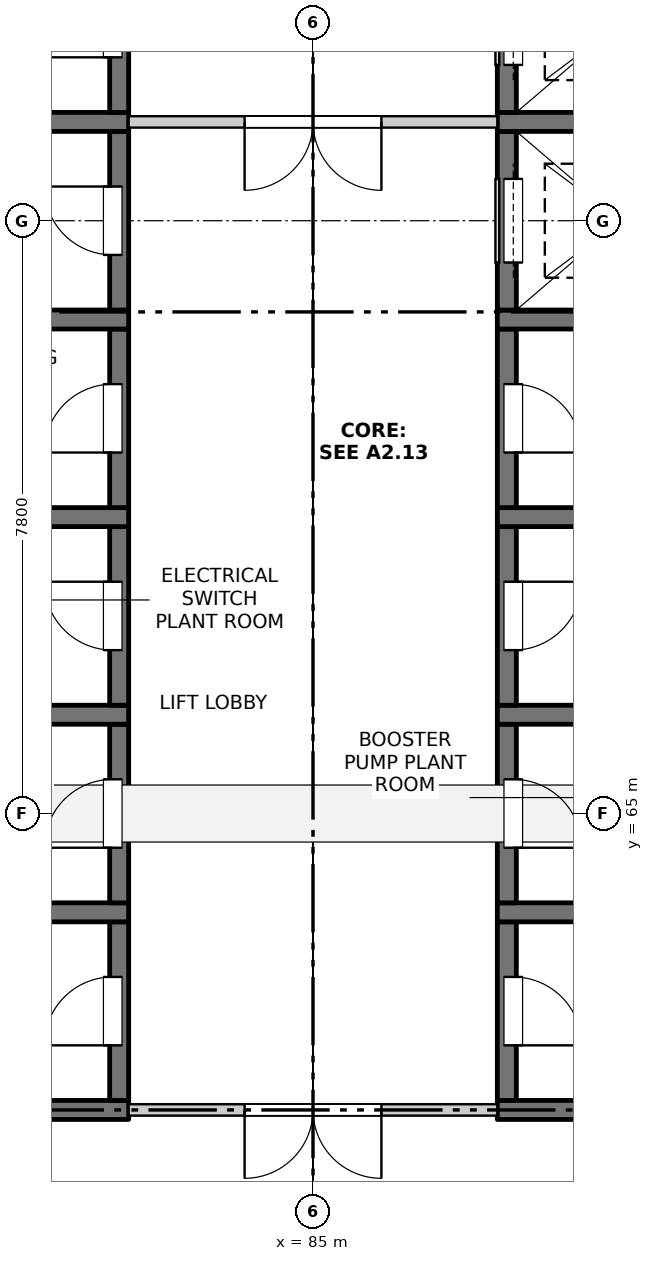
"""IFC4 building model, lengths in metres.
Left out: names, types, materials, properties, quantities, classifications, styles, units other than length and angle.
Written with IfcOpenShell. Run it as: python <this file> out.ifc"""

import sys

from ifc_helpers import new_model, si_unit, direction, frame, frame_2d, origin, place, context, subcontext, project, spatial, rectangle, extrude, element, fill, save


model = new_model("IFC4")
c1 = context("Model", 3, precision=1e-05, world=origin(), true_north=direction((0.0, 1.0)))
c2 = subcontext(c1, "Body", "Model", "MODEL_VIEW")
j1 = project(units=[si_unit("LENGTHUNIT", "METRE"), si_unit("PLANEANGLEUNIT", "RADIAN")], contexts=[c1])
p1 = place(None, origin())
s1 = spatial("IfcSite", under=j1, at=p1, CompositionType="ELEMENT")
p2 = place(p1, origin())
s2 = spatial("IfcBuilding", under=s1, at=p2, CompositionType="ELEMENT")
p3 = place(p2, frame((0.0, 0.0, 266.4)))
s3 = spatial("IfcBuildingStorey", under=s2, at=p3, CompositionType="ELEMENT", Elevation=266.4)
p4 = place(p3, frame((79.575, 61.1, -0.3), z_axis=(0.0, 0.0, 1.0), x_axis=(1.0, 0.0, 0.0)))
e1 = element("IfcWall", 1, at=p4, inside=s3, PredefinedType="SOLIDWALL", context=c2, shape_type="SweptSolid", body=[
    extrude(rectangle(XDim=3.0, YDim=0.25, at=frame_2d((1.5, 0.0))), origin(), (0.0, 0.0, 1.0), 6.0),
])
p5 = place(p3, frame((82.45, 61.225, -0.3), z_axis=(0.0, 0.0, 1.0), x_axis=(0.0, 1.0, 0.0)))
e2 = element("IfcWall", 2, at=p5, inside=s3, PredefinedType="SOLIDWALL", context=c2, shape_type="SweptSolid", body=[
    extrude(rectangle(XDim=2.35, YDim=0.25, at=frame_2d((1.175, 0.0))), origin(), (0.0, 0.0, 1.0), 6.0),
])
p6 = place(p5, frame((0.725, 0.0, 0.3)))
e3 = element("IfcOpeningElement", 3, at=p6, cuts=e2, PredefinedType="OPENING", context=c2, shape_type="SweptSolid", body=[
    extrude(rectangle(XDim=0.9, YDim=2.1, at=frame_2d((0.45, 1.05))), frame((0.0, 0.135, 0.0), z_axis=(0.0, -1.0, 0.0), x_axis=(1.0, 0.0, 0.0)), (0.0, 0.0, 1.0), 0.27),
])
p7 = place(p3, frame((79.575, 63.7, -0.3), z_axis=(0.0, 0.0, 1.0), x_axis=(1.0, 0.0, 0.0)))
e4 = element("IfcWall", 4, at=p7, inside=s3, PredefinedType="SOLIDWALL", context=c2, shape_type="SweptSolid", body=[
    extrude(rectangle(XDim=3.0, YDim=0.25, at=frame_2d((1.5, 0.0))), origin(), (0.0, 0.0, 1.0), 6.0),
])
p8 = place(p3, frame((82.45, 63.825, -0.3), z_axis=(0.0, 0.0, 1.0), x_axis=(0.0, 1.0, 0.0)))
e5 = element("IfcWall", 5, at=p8, inside=s3, PredefinedType="SOLIDWALL", context=c2, shape_type="SweptSolid", body=[
    extrude(rectangle(XDim=2.35, YDim=0.25, at=frame_2d((1.175, 0.0))), origin(), (0.0, 0.0, 1.0), 6.0),
])
p9 = place(p8, frame((0.725, 0.0, 0.3)))
e6 = element("IfcOpeningElement", 6, at=p9, cuts=e5, PredefinedType="OPENING", context=c2, shape_type="SweptSolid", body=[
    extrude(rectangle(XDim=0.9, YDim=2.1, at=frame_2d((0.45, 1.05))), frame((0.0, 0.135, 0.0), z_axis=(0.0, -1.0, 0.0), x_axis=(1.0, 0.0, 0.0)), (0.0, 0.0, 1.0), 0.27),
])
p10 = place(p3, frame((79.575, 66.3, -0.3), z_axis=(0.0, 0.0, 1.0), x_axis=(1.0, 0.0, 0.0)))
e7 = element("IfcWall", 7, at=p10, inside=s3, PredefinedType="SOLIDWALL", context=c2, shape_type="SweptSolid", body=[
    extrude(rectangle(XDim=3.0, YDim=0.25, at=frame_2d((1.5, 0.0))), origin(), (0.0, 0.0, 1.0), 6.0),
])
p11 = place(p3, frame((82.45, 66.425, -0.3), z_axis=(0.0, 0.0, 1.0), x_axis=(0.0, 1.0, 0.0)))
e8 = element("IfcWall", 8, at=p11, inside=s3, PredefinedType="SOLIDWALL", context=c2, shape_type="SweptSolid", body=[
    extrude(rectangle(XDim=2.35, YDim=0.25, at=frame_2d((1.175, 0.0))), origin(), (0.0, 0.0, 1.0), 6.0),
])
p12 = place(p11, frame((0.725, 0.0, 0.3)))
e9 = element("IfcOpeningElement", 9, at=p12, cuts=e8, PredefinedType="OPENING", context=c2, shape_type="SweptSolid", body=[
    extrude(rectangle(XDim=0.9, YDim=2.1, at=frame_2d((0.45, 1.05))), frame((0.0, 0.135, 0.0), z_axis=(0.0, -1.0, 0.0), x_axis=(1.0, 0.0, 0.0)), (0.0, 0.0, 1.0), 0.27),
])
p13 = place(p3, frame((79.575, 68.9, -0.3), z_axis=(0.0, 0.0, 1.0), x_axis=(1.0, 0.0, 0.0)))
e10 = element("IfcWall", 10, at=p13, inside=s3, PredefinedType="SOLIDWALL", context=c2, shape_type="SweptSolid", body=[
    extrude(rectangle(XDim=3.0, YDim=0.25, at=frame_2d((1.5, 0.0))), origin(), (0.0, 0.0, 1.0), 6.0),
])
p14 = place(p3, frame((82.45, 69.025, -0.3), z_axis=(0.0, 0.0, 1.0), x_axis=(0.0, 1.0, 0.0)))
e11 = element("IfcWall", 11, at=p14, inside=s3, PredefinedType="SOLIDWALL", context=c2, shape_type="SweptSolid", body=[
    extrude(rectangle(XDim=2.35, YDim=0.25, at=frame_2d((1.175, 0.0))), origin(), (0.0, 0.0, 1.0), 6.0),
])
p15 = place(p14, frame((0.725, 0.0, 0.3)))
e12 = element("IfcOpeningElement", 12, at=p15, cuts=e11, PredefinedType="OPENING", context=c2, shape_type="SweptSolid", body=[
    extrude(rectangle(XDim=0.9, YDim=2.1, at=frame_2d((0.45, 1.05))), frame((0.0, 0.135, 0.0), z_axis=(0.0, -1.0, 0.0), x_axis=(1.0, 0.0, 0.0)), (0.0, 0.0, 1.0), 0.27),
])
p16 = place(p3, frame((79.575, 71.5, -0.3), z_axis=(0.0, 0.0, 1.0), x_axis=(1.0, 0.0, 0.0)))
e13 = element("IfcWall", 13, at=p16, inside=s3, PredefinedType="SOLIDWALL", context=c2, shape_type="SweptSolid", body=[
    extrude(rectangle(XDim=3.0, YDim=0.25, at=frame_2d((1.5, 0.0))), origin(), (0.0, 0.0, 1.0), 6.0),
])
p17 = place(p3, frame((82.45, 71.625, -0.3), z_axis=(0.0, 0.0, 1.0), x_axis=(0.0, 1.0, 0.0)))
e14 = element("IfcWall", 14, at=p17, inside=s3, PredefinedType="SOLIDWALL", context=c2, shape_type="SweptSolid", body=[
    extrude(rectangle(XDim=2.35, YDim=0.25, at=frame_2d((1.175, 0.0))), origin(), (0.0, 0.0, 1.0), 6.0),
])
p18 = place(p17, frame((0.725, 0.0, 0.3)))
e15 = element("IfcOpeningElement", 15, at=p18, cuts=e14, PredefinedType="OPENING", context=c2, shape_type="SweptSolid", body=[
    extrude(rectangle(XDim=0.9, YDim=2.1, at=frame_2d((0.45, 1.05))), frame((0.0, 0.135, 0.0), z_axis=(0.0, -1.0, 0.0), x_axis=(1.0, 0.0, 0.0)), (0.0, 0.0, 1.0), 0.27),
])
p19 = place(p3, frame((79.575, 74.1, -0.3), z_axis=(0.0, 0.0, 1.0), x_axis=(1.0, 0.0, 0.0)))
e16 = element("IfcWall", 16, at=p19, inside=s3, PredefinedType="SOLIDWALL", context=c2, shape_type="SweptSolid", body=[
    extrude(rectangle(XDim=3.0, YDim=0.25, at=frame_2d((1.5, 0.0))), origin(), (0.0, 0.0, 1.0), 6.0),
])
p20 = place(p3, frame((82.45, 74.225, -0.3), z_axis=(0.0, 0.0, 1.0), x_axis=(0.0, 1.0, 0.0)))
e17 = element("IfcWall", 17, at=p20, inside=s3, PredefinedType="SOLIDWALL", context=c2, shape_type="SweptSolid", body=[
    extrude(rectangle(XDim=2.35, YDim=0.25, at=frame_2d((1.175, 0.0))), origin(), (0.0, 0.0, 1.0), 6.0),
])
p21 = place(p20, frame((0.725, 0.0, 0.3)))
e18 = element("IfcOpeningElement", 18, at=p21, cuts=e17, PredefinedType="OPENING", context=c2, shape_type="SweptSolid", body=[
    extrude(rectangle(XDim=0.9, YDim=2.1, at=frame_2d((0.45, 1.05))), frame((0.0, 0.135, 0.0), z_axis=(0.0, -1.0, 0.0), x_axis=(1.0, 0.0, 0.0)), (0.0, 0.0, 1.0), 0.27),
])
p22 = place(p3, frame((87.425, 61.1, -0.3), z_axis=(0.0, 0.0, 1.0), x_axis=(1.0, 0.0, 0.0)))
e19 = element("IfcWall", 19, at=p22, inside=s3, PredefinedType="SOLIDWALL", context=c2, shape_type="SweptSolid", body=[
    extrude(rectangle(XDim=3.0, YDim=0.25, at=frame_2d((1.5, 0.0))), origin(), (0.0, 0.0, 1.0), 6.0),
])
p23 = place(p3, frame((87.55, 61.225, -0.3), z_axis=(0.0, 0.0, 1.0), x_axis=(0.0, 1.0, 0.0)))
e20 = element("IfcWall", 20, at=p23, inside=s3, PredefinedType="SOLIDWALL", context=c2, shape_type="SweptSolid", body=[
    extrude(rectangle(XDim=2.35, YDim=0.25, at=frame_2d((1.175, 0.0))), origin(), (0.0, 0.0, 1.0), 6.0),
])
p24 = place(p23, frame((0.725, 0.0, 0.3)))
e21 = element("IfcOpeningElement", 21, at=p24, cuts=e20, PredefinedType="OPENING", context=c2, shape_type="SweptSolid", body=[
    extrude(rectangle(XDim=0.9, YDim=2.1, at=frame_2d((0.45, 1.05))), frame((0.0, 0.135, 0.0), z_axis=(0.0, -1.0, 0.0), x_axis=(1.0, 0.0, 0.0)), (0.0, 0.0, 1.0), 0.27),
])
p25 = place(p3, frame((87.425, 63.7, -0.3), z_axis=(0.0, 0.0, 1.0), x_axis=(1.0, 0.0, 0.0)))
e22 = element("IfcWall", 22, at=p25, inside=s3, PredefinedType="SOLIDWALL", context=c2, shape_type="SweptSolid", body=[
    extrude(rectangle(XDim=3.0, YDim=0.25, at=frame_2d((1.5, 0.0))), origin(), (0.0, 0.0, 1.0), 6.0),
])
p26 = place(p3, frame((87.55, 63.825, -0.3), z_axis=(0.0, 0.0, 1.0), x_axis=(0.0, 1.0, 0.0)))
e23 = element("IfcWall", 23, at=p26, inside=s3, PredefinedType="SOLIDWALL", context=c2, shape_type="SweptSolid", body=[
    extrude(rectangle(XDim=2.35, YDim=0.25, at=frame_2d((1.175, 0.0))), origin(), (0.0, 0.0, 1.0), 6.0),
])
p27 = place(p26, frame((0.725, 0.0, 0.3)))
e24 = element("IfcOpeningElement", 24, at=p27, cuts=e23, PredefinedType="OPENING", context=c2, shape_type="SweptSolid", body=[
    extrude(rectangle(XDim=0.9, YDim=2.1, at=frame_2d((0.45, 1.05))), frame((0.0, 0.135, 0.0), z_axis=(0.0, -1.0, 0.0), x_axis=(1.0, 0.0, 0.0)), (0.0, 0.0, 1.0), 0.27),
])
p28 = place(p3, frame((87.425, 66.3, -0.3), z_axis=(0.0, 0.0, 1.0), x_axis=(1.0, 0.0, 0.0)))
e25 = element("IfcWall", 25, at=p28, inside=s3, PredefinedType="SOLIDWALL", context=c2, shape_type="SweptSolid", body=[
    extrude(rectangle(XDim=3.0, YDim=0.25, at=frame_2d((1.5, 0.0))), origin(), (0.0, 0.0, 1.0), 6.0),
])
p29 = place(p3, frame((87.55, 66.425, -0.3), z_axis=(0.0, 0.0, 1.0), x_axis=(0.0, 1.0, 0.0)))
e26 = element("IfcWall", 26, at=p29, inside=s3, PredefinedType="SOLIDWALL", context=c2, shape_type="SweptSolid", body=[
    extrude(rectangle(XDim=2.35, YDim=0.25, at=frame_2d((1.175, 0.0))), origin(), (0.0, 0.0, 1.0), 6.0),
])
p30 = place(p29, frame((0.725, 0.0, 0.3)))
e27 = element("IfcOpeningElement", 27, at=p30, cuts=e26, PredefinedType="OPENING", context=c2, shape_type="SweptSolid", body=[
    extrude(rectangle(XDim=0.9, YDim=2.1, at=frame_2d((0.45, 1.05))), frame((0.0, 0.135, 0.0), z_axis=(0.0, -1.0, 0.0), x_axis=(1.0, 0.0, 0.0)), (0.0, 0.0, 1.0), 0.27),
])
p31 = place(p3, frame((87.425, 68.9, -0.3), z_axis=(0.0, 0.0, 1.0), x_axis=(1.0, 0.0, 0.0)))
e28 = element("IfcWall", 28, at=p31, inside=s3, PredefinedType="SOLIDWALL", context=c2, shape_type="SweptSolid", body=[
    extrude(rectangle(XDim=3.0, YDim=0.25, at=frame_2d((1.5, 0.0))), origin(), (0.0, 0.0, 1.0), 6.0),
])
p32 = place(p3, frame((87.55, 69.025, -0.3), z_axis=(0.0, 0.0, 1.0), x_axis=(0.0, 1.0, 0.0)))
e29 = element("IfcWall", 29, at=p32, inside=s3, PredefinedType="SOLIDWALL", context=c2, shape_type="SweptSolid", body=[
    extrude(rectangle(XDim=2.35, YDim=0.25, at=frame_2d((1.175, 0.0))), origin(), (0.0, 0.0, 1.0), 6.0),
])
p33 = place(p32, frame((0.725, 0.0, 0.3)))
e30 = element("IfcOpeningElement", 30, at=p33, cuts=e29, PredefinedType="OPENING", context=c2, shape_type="SweptSolid", body=[
    extrude(rectangle(XDim=0.9, YDim=2.1, at=frame_2d((0.45, 1.05))), frame((0.0, 0.135, 0.0), z_axis=(0.0, -1.0, 0.0), x_axis=(1.0, 0.0, 0.0)), (0.0, 0.0, 1.0), 0.27),
])
p34 = place(p3, frame((87.425, 71.5, -0.3), z_axis=(0.0, 0.0, 1.0), x_axis=(1.0, 0.0, 0.0)))
e31 = element("IfcWall", 31, at=p34, inside=s3, PredefinedType="SOLIDWALL", context=c2, shape_type="SweptSolid", body=[
    extrude(rectangle(XDim=3.0, YDim=0.25, at=frame_2d((1.5, 0.0))), origin(), (0.0, 0.0, 1.0), 6.0),
])
p35 = place(p3, frame((87.55, 71.625, -0.3), z_axis=(0.0, 0.0, 1.0), x_axis=(0.0, 1.0, 0.0)))
e32 = element("IfcWall", 32, at=p35, inside=s3, PredefinedType="SOLIDWALL", context=c2, shape_type="SweptSolid", body=[
    extrude(rectangle(XDim=2.35, YDim=0.25, at=frame_2d((1.175, 0.0))), origin(), (0.0, 0.0, 1.0), 6.0),
])
p36 = place(p35, frame((0.625, 0.0, 0.3)))
e33 = element("IfcOpeningElement", 33, at=p36, cuts=e32, PredefinedType="OPENING", context=c2, shape_type="SweptSolid", body=[
    extrude(rectangle(XDim=1.1, YDim=2.1, at=frame_2d((0.55, 1.05))), frame((0.0, 0.135, 0.0), z_axis=(0.0, -1.0, 0.0), x_axis=(1.0, 0.0, 0.0)), (0.0, 0.0, 1.0), 0.27),
])
p37 = place(p3, frame((87.425, 74.1, -0.3), z_axis=(0.0, 0.0, 1.0), x_axis=(1.0, 0.0, 0.0)))
e34 = element("IfcWall", 34, at=p37, inside=s3, PredefinedType="SOLIDWALL", context=c2, shape_type="SweptSolid", body=[
    extrude(rectangle(XDim=3.0, YDim=0.25, at=frame_2d((1.5, 0.0))), origin(), (0.0, 0.0, 1.0), 6.0),
])
p38 = place(p3, frame((87.55, 74.225, -0.3), z_axis=(0.0, 0.0, 1.0), x_axis=(0.0, 1.0, 0.0)))
e35 = element("IfcWall", 35, at=p38, inside=s3, PredefinedType="SOLIDWALL", context=c2, shape_type="SweptSolid", body=[
    extrude(rectangle(XDim=2.35, YDim=0.25, at=frame_2d((1.175, 0.0))), origin(), (0.0, 0.0, 1.0), 6.0),
])
p39 = place(p38, frame((0.625, 0.0, 0.3)))
e36 = element("IfcOpeningElement", 36, at=p39, cuts=e35, PredefinedType="OPENING", context=c2, shape_type="SweptSolid", body=[
    extrude(rectangle(XDim=1.1, YDim=2.1, at=frame_2d((0.55, 1.05))), frame((0.0, 0.135, 0.0), z_axis=(0.0, -1.0, 0.0), x_axis=(1.0, 0.0, 0.0)), (0.0, 0.0, 1.0), 0.27),
])
p40 = place(p3, frame((82.575, 61.1, 0.0), z_axis=(0.0, 0.0, 1.0), x_axis=(1.0, 0.0, 0.0)))
e37 = element("IfcWall", 37, at=p40, inside=s3, PredefinedType="PARTITIONING", context=c2, shape_type="SweptSolid", body=[
    extrude(rectangle(XDim=4.85, YDim=0.15, at=frame_2d((2.425, 0.0))), origin(), (0.0, 0.0, 1.0), 5.7),
])
p41 = place(p40, frame((1.525, 0.0, 0.0)))
e38 = element("IfcOpeningElement", 38, at=p41, cuts=e37, PredefinedType="OPENING", context=c2, shape_type="SweptSolid", body=[
    extrude(rectangle(XDim=1.8, YDim=2.1, at=frame_2d((0.9, 1.05))), frame((0.0, 0.085, 0.0), z_axis=(0.0, -1.0, 0.0), x_axis=(1.0, 0.0, 0.0)), (0.0, 0.0, 1.0), 0.17),
])
p42 = place(p3, frame((82.575, 74.1, 0.0), z_axis=(0.0, 0.0, 1.0), x_axis=(1.0, 0.0, 0.0)))
e39 = element("IfcWall", 39, at=p42, inside=s3, PredefinedType="PARTITIONING", context=c2, shape_type="SweptSolid", body=[
    extrude(rectangle(XDim=4.85, YDim=0.15, at=frame_2d((2.425, 0.0))), origin(), (0.0, 0.0, 1.0), 5.7),
])
p43 = place(p42, frame((1.525, 0.0, 0.0)))
e40 = element("IfcOpeningElement", 40, at=p43, cuts=e39, PredefinedType="OPENING", context=c2, shape_type="SweptSolid", body=[
    extrude(rectangle(XDim=1.8, YDim=2.1, at=frame_2d((0.9, 1.05))), frame((0.0, 0.085, 0.0), z_axis=(0.0, -1.0, 0.0), x_axis=(1.0, 0.0, 0.0)), (0.0, 0.0, 1.0), 0.17),
])
p44 = place(p41, origin())
e41 = element("IfcDoor", 41, at=p44, inside=s3, OperationType="DOUBLE_DOOR_SINGLE_SWING", PredefinedType="DOOR", context=c2, shape_type="SweptSolid", body=[
    extrude(rectangle(XDim=1.8, YDim=2.1, at=frame_2d((0.9, 1.05))), frame((0.0, 0.025, 0.0), z_axis=(0.0, -1.0, 0.0), x_axis=(1.0, 0.0, 0.0)), (0.0, 0.0, 1.0), 0.05),
])
fill(e38, e41)
p45 = place(p6, origin())
e42 = element("IfcDoor", 42, at=p45, inside=s3, OperationType="SINGLE_SWING_LEFT", PredefinedType="DOOR", context=c2, shape_type="SweptSolid", body=[
    extrude(rectangle(XDim=0.9, YDim=2.1, at=frame_2d((0.45, 1.05))), frame((0.0, 0.11, 0.0), z_axis=(0.0, -1.0, 0.0), x_axis=(1.0, 0.0, 0.0)), (0.0, 0.0, 1.0), 0.05),
])
fill(e3, e42)
p46 = place(p24, origin())
e43 = element("IfcDoor", 43, at=p46, inside=s3, OperationType="SINGLE_SWING_RIGHT", PredefinedType="DOOR", context=c2, shape_type="SweptSolid", body=[
    extrude(rectangle(XDim=0.9, YDim=2.1, at=frame_2d((0.45, 1.05))), frame((0.0, -0.06, 0.0), z_axis=(0.0, -1.0, 0.0), x_axis=(1.0, 0.0, 0.0)), (0.0, 0.0, 1.0), 0.05),
])
fill(e21, e43)
p47 = place(p9, origin())
e44 = element("IfcDoor", 44, at=p47, inside=s3, OperationType="SINGLE_SWING_LEFT", PredefinedType="DOOR", context=c2, shape_type="SweptSolid", body=[
    extrude(rectangle(XDim=0.9, YDim=2.1, at=frame_2d((0.45, 1.05))), frame((0.0, 0.11, 0.0), z_axis=(0.0, -1.0, 0.0), x_axis=(1.0, 0.0, 0.0)), (0.0, 0.0, 1.0), 0.05),
])
fill(e6, e44)
p48 = place(p27, origin())
e45 = element("IfcDoor", 45, at=p48, inside=s3, OperationType="SINGLE_SWING_RIGHT", PredefinedType="DOOR", context=c2, shape_type="SweptSolid", body=[
    extrude(rectangle(XDim=0.9, YDim=2.1, at=frame_2d((0.45, 1.05))), frame((0.0, -0.06, 0.0), z_axis=(0.0, -1.0, 0.0), x_axis=(1.0, 0.0, 0.0)), (0.0, 0.0, 1.0), 0.05),
])
fill(e24, e45)
p49 = place(p12, origin())
e46 = element("IfcDoor", 46, at=p49, inside=s3, OperationType="SINGLE_SWING_RIGHT", PredefinedType="DOOR", context=c2, shape_type="SweptSolid", body=[
    extrude(rectangle(XDim=0.9, YDim=2.1, at=frame_2d((0.45, 1.05))), frame((0.0, 0.11, 0.0), z_axis=(0.0, -1.0, 0.0), x_axis=(1.0, 0.0, 0.0)), (0.0, 0.0, 1.0), 0.05),
])
fill(e9, e46)
p50 = place(p30, origin())
e47 = element("IfcDoor", 47, at=p50, inside=s3, OperationType="SINGLE_SWING_LEFT", PredefinedType="DOOR", context=c2, shape_type="SweptSolid", body=[
    extrude(rectangle(XDim=0.9, YDim=2.1, at=frame_2d((0.45, 1.05))), frame((0.0, -0.06, 0.0), z_axis=(0.0, -1.0, 0.0), x_axis=(1.0, 0.0, 0.0)), (0.0, 0.0, 1.0), 0.05),
])
fill(e27, e47)
p51 = place(p15, origin())
e48 = element("IfcDoor", 48, at=p51, inside=s3, OperationType="SINGLE_SWING_LEFT", PredefinedType="DOOR", context=c2, shape_type="SweptSolid", body=[
    extrude(rectangle(XDim=0.9, YDim=2.1, at=frame_2d((0.45, 1.05))), frame((0.0, 0.11, 0.0), z_axis=(0.0, -1.0, 0.0), x_axis=(1.0, 0.0, 0.0)), (0.0, 0.0, 1.0), 0.05),
])
fill(e12, e48)
p52 = place(p33, origin())
e49 = element("IfcDoor", 49, at=p52, inside=s3, OperationType="SINGLE_SWING_RIGHT", PredefinedType="DOOR", context=c2, shape_type="SweptSolid", body=[
    extrude(rectangle(XDim=0.9, YDim=2.1, at=frame_2d((0.45, 1.05))), frame((0.0, -0.06, 0.0), z_axis=(0.0, -1.0, 0.0), x_axis=(1.0, 0.0, 0.0)), (0.0, 0.0, 1.0), 0.05),
])
fill(e30, e49)
p53 = place(p18, origin())
e50 = element("IfcDoor", 50, at=p53, inside=s3, OperationType="SINGLE_SWING_RIGHT", PredefinedType="DOOR", context=c2, shape_type="SweptSolid", body=[
    extrude(rectangle(XDim=0.9, YDim=2.1, at=frame_2d((0.45, 1.05))), frame((0.0, 0.11, 0.0), z_axis=(0.0, -1.0, 0.0), x_axis=(1.0, 0.0, 0.0)), (0.0, 0.0, 1.0), 0.05),
])
fill(e15, e50)
p54 = place(p36, origin())
e51 = element("IfcDoor", 51, at=p54, inside=s3, OperationType="SLIDING_TO_LEFT", PredefinedType="DOOR", context=c2, shape_type="SweptSolid", body=[
    extrude(rectangle(XDim=1.1, YDim=2.1, at=frame_2d((0.55, 1.05))), frame((0.0, -0.06, 0.0), z_axis=(0.0, -1.0, 0.0), x_axis=(1.0, 0.0, 0.0)), (0.0, 0.0, 1.0), 0.05),
])
fill(e33, e51)
p55 = place(p43, origin())
e52 = element("IfcDoor", 52, at=p55, inside=s3, OperationType="DOUBLE_DOOR_SINGLE_SWING", PredefinedType="DOOR", context=c2, shape_type="SweptSolid", body=[
    extrude(rectangle(XDim=1.8, YDim=2.1, at=frame_2d((0.9, 1.05))), frame((0.0, 0.025, 0.0), z_axis=(0.0, -1.0, 0.0), x_axis=(1.0, 0.0, 0.0)), (0.0, 0.0, 1.0), 0.05),
])
fill(e40, e52)
p56 = place(p21, origin())
e53 = element("IfcDoor", 53, at=p56, inside=s3, OperationType="SINGLE_SWING_LEFT", PredefinedType="DOOR", context=c2, shape_type="SweptSolid", body=[
    extrude(rectangle(XDim=0.9, YDim=2.1, at=frame_2d((0.45, 1.05))), frame((0.0, 0.11, 0.0), z_axis=(0.0, -1.0, 0.0), x_axis=(1.0, 0.0, 0.0)), (0.0, 0.0, 1.0), 0.05),
])
fill(e18, e53)
p57 = place(p39, origin())
e54 = element("IfcDoor", 54, at=p57, inside=s3, OperationType="SLIDING_TO_LEFT", PredefinedType="DOOR", context=c2, shape_type="SweptSolid", body=[
    extrude(rectangle(XDim=1.1, YDim=2.1, at=frame_2d((0.55, 1.05))), frame((0.0, -0.06, 0.0), z_axis=(0.0, -1.0, 0.0), x_axis=(1.0, 0.0, 0.0)), (0.0, 0.0, 1.0), 0.05),
])
fill(e36, e54)
save(model, sys.argv[1])
